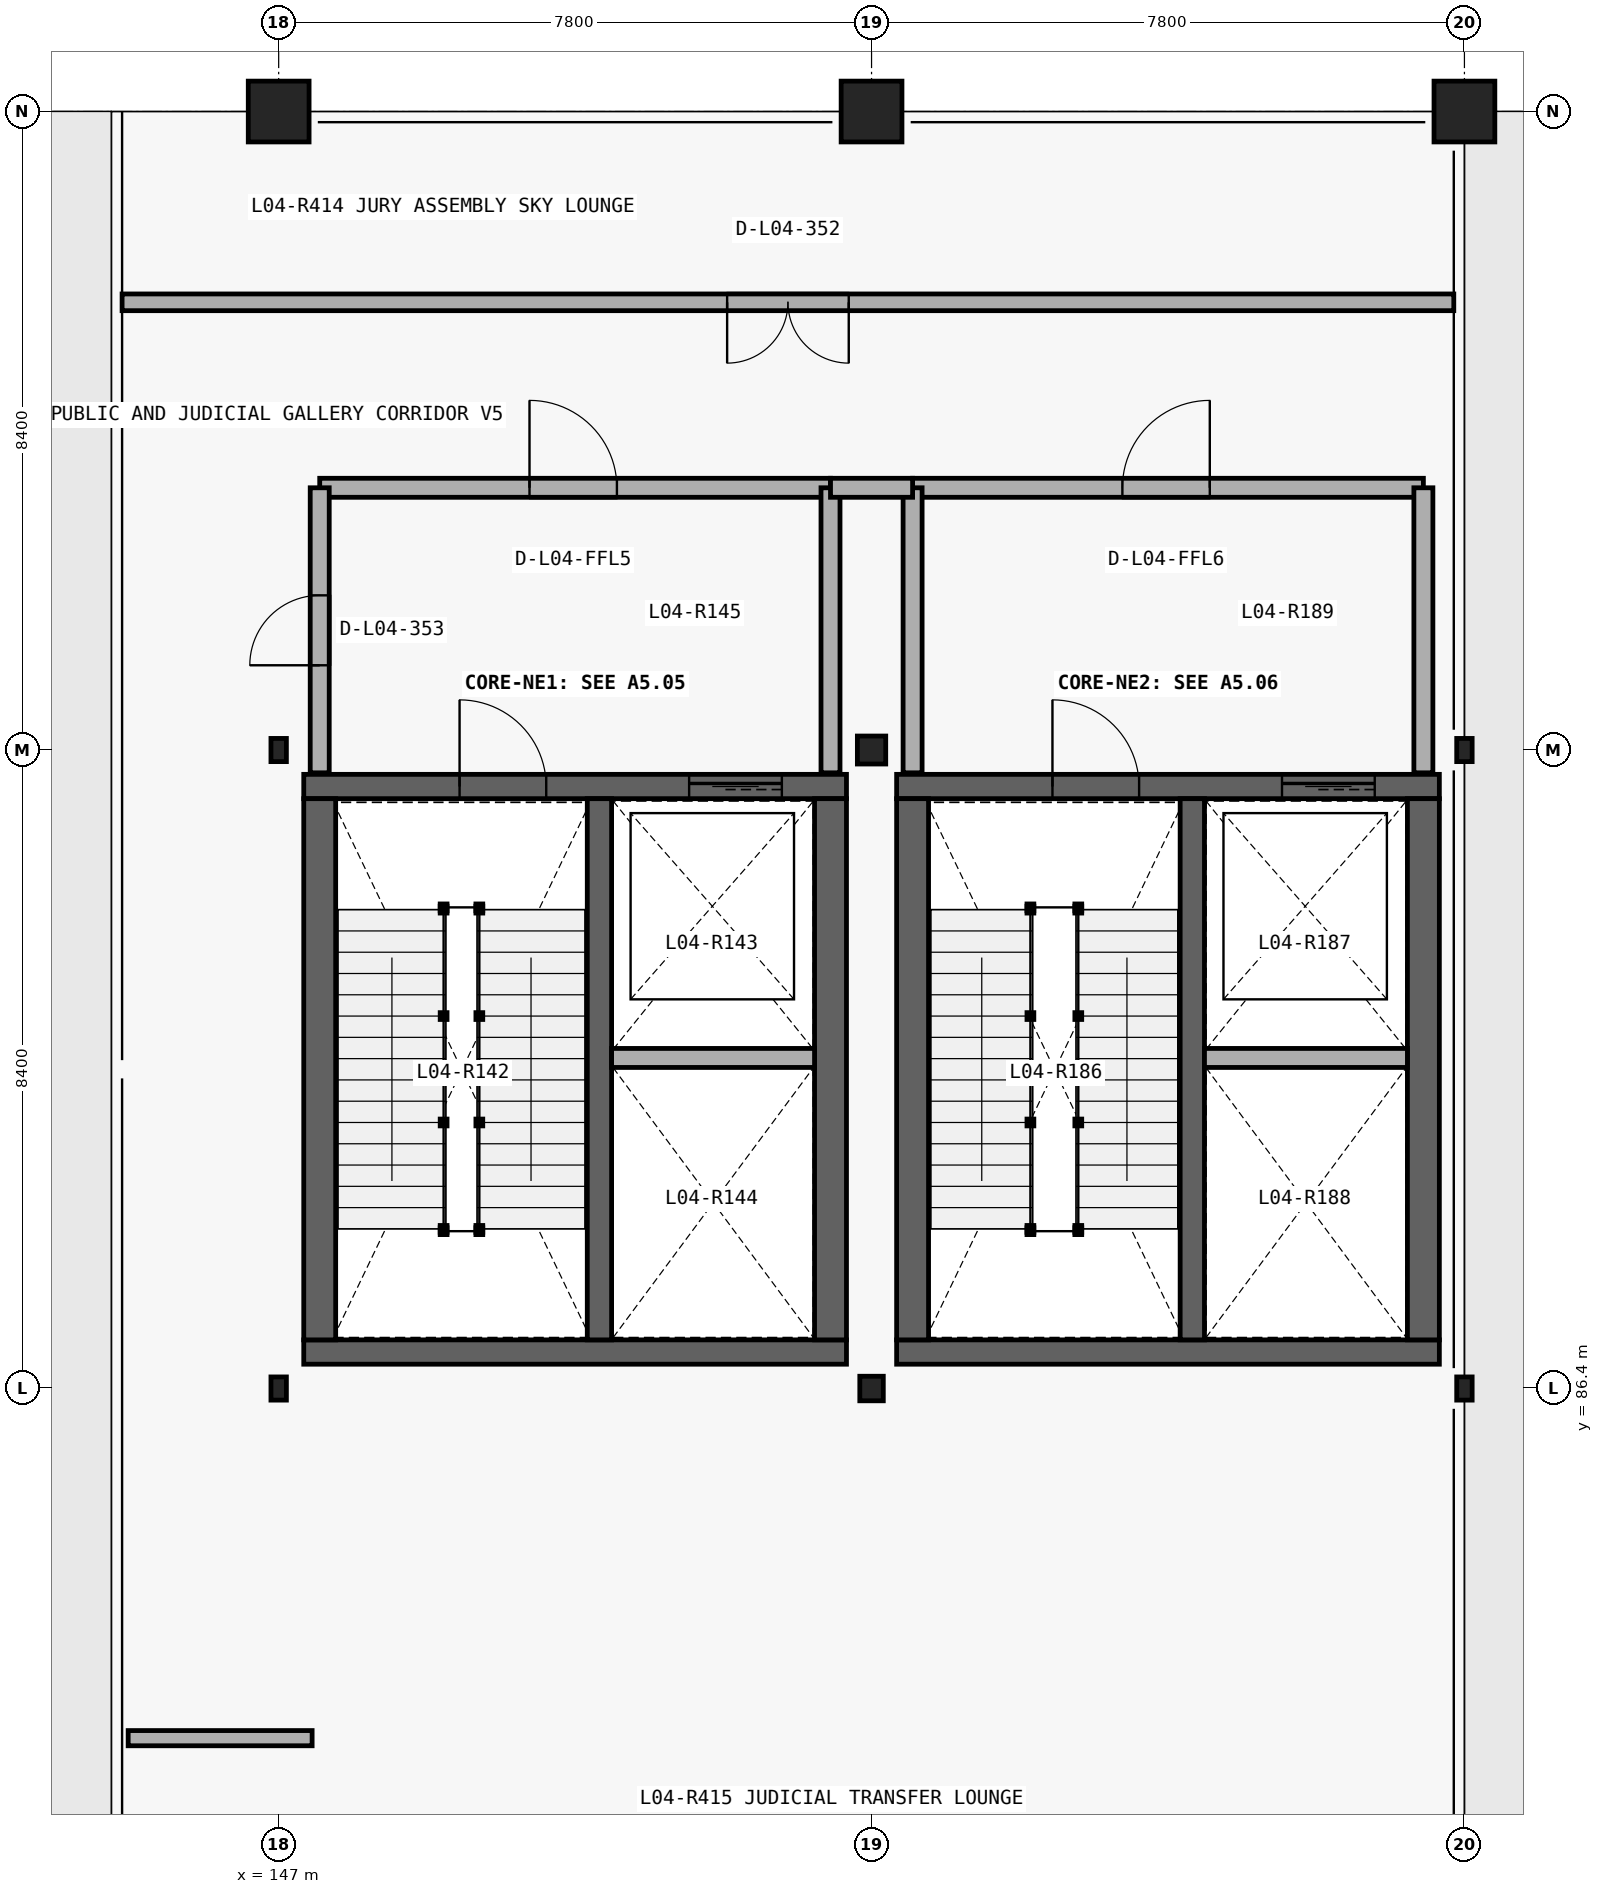
"""IFC4 building model, lengths in metres.
Left out: names, types, materials, properties, quantities, classifications, styles, units other than length and angle.
Written with IfcOpenShell. Run it as: python <this file> out.ifc"""

import sys

from ifc_helpers import new_model, si_unit, direction, frame, frame_2d, origin_with_axes, origin_2d_with_axis, place, context, subcontext, project, spatial, rectangle, hollow_rectangle, circle, i_section, extrude, element, fill, save


model = new_model("IFC4")
c1 = context("Model", 3, precision=1e-05, world=origin_with_axes(), true_north=direction((0.0, 1.0)))
c2 = subcontext(c1, "Body", "Model", "MODEL_VIEW")
j1 = project(units=[si_unit("LENGTHUNIT", "METRE"), si_unit("PLANEANGLEUNIT", "RADIAN")], contexts=[c1])
p1 = place(None, origin_with_axes())
s1 = spatial("IfcSite", under=j1, at=p1, CompositionType="ELEMENT")
p2 = place(p1, origin_with_axes())
s2 = spatial("IfcBuilding", under=s1, at=p2, CompositionType="ELEMENT")
p3 = place(p2, frame((0.0, 0.0, 20.4), z_axis=(0.0, 0.0, 1.0), x_axis=(1.0, 0.0, 0.0)))
s3 = spatial("IfcBuildingStorey", under=s2, at=p3, CompositionType="ELEMENT", Elevation=20.4)
p4 = place(None, frame((147.33, 86.88, 20.4), z_axis=(0.0, 0.0, 1.0), x_axis=(1.0, 0.0, 0.0)))
e1 = element("IfcWall", 1, at=p4, inside=s3, PredefinedType="SHEAR", context=c2, shape_type="SweptSolid", body=[
    extrude(rectangle(XDim=7.14, YDim=0.32, at=frame_2d((3.57, 0.0), x_axis=(1.0, 0.0))), origin_with_axes(), (0.0, 0.0, 1.0), 4.5),
])
p5 = place(None, frame((154.47, 94.32, 20.4), z_axis=(0.0, 0.0, 1.0), x_axis=(-1.0, 0.0, 0.0)))
e2 = element("IfcWall", 2, at=p5, inside=s3, PredefinedType="SHEAR", context=c2, shape_type="SweptSolid", body=[
    extrude(rectangle(XDim=7.14, YDim=0.32, at=frame_2d((3.57, 0.0), x_axis=(1.0, 0.0))), origin_with_axes(), (0.0, 0.0, 1.0), 4.5),
])
p6 = place(None, frame((149.95, 94.32, 20.4), z_axis=(0.0, 0.0, 1.0), x_axis=(-1.0, 0.0, 0.0)))
e3 = element("IfcOpeningElement", 3, at=p6, cuts=e2, PredefinedType="OPENING", context=c2, shape_type="SweptSolid", body=[
    extrude(rectangle(XDim=1.14, YDim=2.18, at=frame_2d((0.0, 1.09), x_axis=(1.0, 0.0))), frame((0.0, 0.17, 0.0), z_axis=(0.0, -1.0, 0.0), x_axis=(1.0, 0.0, 0.0)), (0.0, 0.0, 1.0), 0.34),
])
p7 = place(None, frame((153.01, 94.32, 20.4), z_axis=(0.0, 0.0, 1.0), x_axis=(-1.0, 0.0, 0.0)))
e4 = element("IfcOpeningElement", 4, at=p7, cuts=e2, PredefinedType="OPENING", context=c2, shape_type="SweptSolid", body=[
    extrude(rectangle(XDim=1.22, YDim=2.28, at=frame_2d((0.0, 1.14), x_axis=(1.0, 0.0))), frame((0.0, 0.17, 0.0), z_axis=(0.0, -1.0, 0.0), x_axis=(1.0, 0.0, 0.0)), (0.0, 0.0, 1.0), 0.34),
])
for number, where, z_axis, x_axis in (
    (5, (154.26, 87.04, 20.4), (0.0, 0.0, 1.0), (0.0, 1.0, 0.0)),
    (6, (147.54, 94.16, 20.4), (0.0, 0.0, 1.0), (0.0, -1.0, 0.0)),
):
    element("IfcWall", number, at=place(None, frame(where, z_axis=z_axis, x_axis=x_axis)), inside=s3, PredefinedType="SHEAR", context=c2, shape_type="SweptSolid", body=[
        extrude(rectangle(XDim=7.12, YDim=0.42, at=frame_2d((3.56, 0.0), x_axis=(1.0, 0.0))), origin_with_axes(), (0.0, 0.0, 1.0), 4.5),
    ])
p8 = place(None, frame((151.22, 87.04, 20.4), z_axis=(0.0, 0.0, 1.0), x_axis=(0.0, 1.0, 0.0)))
e7 = element("IfcWall", 7, at=p8, inside=s3, PredefinedType="SHEAR", context=c2, shape_type="SweptSolid", body=[
    extrude(rectangle(XDim=7.12, YDim=0.32, at=frame_2d((3.56, 0.0), x_axis=(1.0, 0.0))), origin_with_axes(), (0.0, 0.0, 1.0), 4.5),
])
p9 = place(None, frame((151.38, 90.749, 20.4), z_axis=(0.0, 0.0, 1.0), x_axis=(1.0, 0.0, 0.0)))
e8 = element("IfcWall", 8, at=p9, inside=s3, PredefinedType="PARTITIONING", context=c2, shape_type="SweptSolid", body=[
    extrude(rectangle(XDim=2.67, YDim=0.25, at=frame_2d((1.335, 0.0), x_axis=(1.0, 0.0))), origin_with_axes(), (0.0, 0.0, 1.0), 4.18),
])
p10 = place(None, frame((154.26, 98.25, 20.4), z_axis=(0.0, 0.0, 1.0), x_axis=(-1.0, 0.0, 0.0)))
e9 = element("IfcWall", 9, at=p10, inside=s3, PredefinedType="PARTITIONING", context=c2, shape_type="SweptSolid", body=[
    extrude(rectangle(XDim=6.72, YDim=0.25, at=frame_2d((3.36, 0.0), x_axis=(1.0, 0.0))), origin_with_axes(), (0.0, 0.0, 1.0), 4.18),
])
p11 = place(None, frame((150.875, 98.25, 20.4), z_axis=(0.0, 0.0, 1.0), x_axis=(-1.0, 0.0, 0.0)))
e10 = element("IfcOpeningElement", 10, at=p11, cuts=e9, PredefinedType="OPENING", context=c2, shape_type="SweptSolid", body=[
    extrude(rectangle(XDim=1.15, YDim=2.25, at=frame_2d((0.0, 1.125), x_axis=(1.0, 0.0))), frame((0.0, 0.135, 0.0), z_axis=(0.0, -1.0, 0.0), x_axis=(1.0, 0.0, 0.0)), (0.0, 0.0, 1.0), 0.27),
])
p12 = place(None, frame((147.54, 94.5, 20.4), z_axis=(0.0, 0.0, 1.0), x_axis=(0.0, 1.0, 0.0)))
e11 = element("IfcWall", 11, at=p12, inside=s3, PredefinedType="PARTITIONING", context=c2, shape_type="SweptSolid", body=[
    extrude(rectangle(XDim=3.75, YDim=0.25, at=frame_2d((1.875, 0.0), x_axis=(1.0, 0.0))), origin_with_axes(), (0.0, 0.0, 1.0), 4.18),
])
p13 = place(None, frame((147.54, 96.375, 20.4), z_axis=(0.0, 0.0, 1.0), x_axis=(0.0, 1.0, 0.0)))
e12 = element("IfcOpeningElement", 12, at=p13, cuts=e11, PredefinedType="OPENING", context=c2, shape_type="SweptSolid", body=[
    extrude(rectangle(XDim=0.92, YDim=2.14, at=frame_2d((0.0, 1.07), x_axis=(1.0, 0.0))), frame((0.0, 0.135, 0.0), z_axis=(0.0, -1.0, 0.0), x_axis=(1.0, 0.0, 0.0)), (0.0, 0.0, 1.0), 0.27),
])
p14 = place(None, frame((154.26, 94.5, 20.4), z_axis=(0.0, 0.0, 1.0), x_axis=(0.0, 1.0, 0.0)))
e13 = element("IfcWall", 13, at=p14, inside=s3, PredefinedType="PARTITIONING", context=c2, shape_type="SweptSolid", body=[
    extrude(rectangle(XDim=3.75, YDim=0.25, at=frame_2d((1.875, 0.0), x_axis=(1.0, 0.0))), origin_with_axes(), (0.0, 0.0, 1.0), 4.18),
])
p15 = place(None, frame((155.13, 86.88, 20.4), z_axis=(0.0, 0.0, 1.0), x_axis=(1.0, 0.0, 0.0)))
e14 = element("IfcWall", 14, at=p15, inside=s3, PredefinedType="SHEAR", context=c2, shape_type="SweptSolid", body=[
    extrude(rectangle(XDim=7.14, YDim=0.32, at=frame_2d((3.57, 0.0), x_axis=(1.0, 0.0))), origin_with_axes(), (0.0, 0.0, 1.0), 4.5),
])
p16 = place(None, frame((162.27, 94.32, 20.4), z_axis=(0.0, 0.0, 1.0), x_axis=(-1.0, 0.0, 0.0)))
e15 = element("IfcWall", 15, at=p16, inside=s3, PredefinedType="SHEAR", context=c2, shape_type="SweptSolid", body=[
    extrude(rectangle(XDim=7.14, YDim=0.32, at=frame_2d((3.57, 0.0), x_axis=(1.0, 0.0))), origin_with_axes(), (0.0, 0.0, 1.0), 4.5),
])
p17 = place(None, frame((157.75, 94.32, 20.4), z_axis=(0.0, 0.0, 1.0), x_axis=(-1.0, 0.0, 0.0)))
e16 = element("IfcOpeningElement", 16, at=p17, cuts=e15, PredefinedType="OPENING", context=c2, shape_type="SweptSolid", body=[
    extrude(rectangle(XDim=1.14, YDim=2.18, at=frame_2d((0.0, 1.09), x_axis=(1.0, 0.0))), frame((0.0, 0.17, 0.0), z_axis=(0.0, -1.0, 0.0), x_axis=(1.0, 0.0, 0.0)), (0.0, 0.0, 1.0), 0.34),
])
p18 = place(None, frame((160.81, 94.32, 20.4), z_axis=(0.0, 0.0, 1.0), x_axis=(-1.0, 0.0, 0.0)))
e17 = element("IfcOpeningElement", 17, at=p18, cuts=e15, PredefinedType="OPENING", context=c2, shape_type="SweptSolid", body=[
    extrude(rectangle(XDim=1.22, YDim=2.28, at=frame_2d((0.0, 1.14), x_axis=(1.0, 0.0))), frame((0.0, 0.17, 0.0), z_axis=(0.0, -1.0, 0.0), x_axis=(1.0, 0.0, 0.0)), (0.0, 0.0, 1.0), 0.34),
])
for number, where, z_axis, x_axis in (
    (18, (162.06, 87.04, 20.4), (0.0, 0.0, 1.0), (0.0, 1.0, 0.0)),
    (19, (155.34, 94.16, 20.4), (0.0, 0.0, 1.0), (0.0, -1.0, 0.0)),
):
    element("IfcWall", number, at=place(None, frame(where, z_axis=z_axis, x_axis=x_axis)), inside=s3, PredefinedType="SHEAR", context=c2, shape_type="SweptSolid", body=[
        extrude(rectangle(XDim=7.12, YDim=0.42, at=frame_2d((3.56, 0.0), x_axis=(1.0, 0.0))), origin_with_axes(), (0.0, 0.0, 1.0), 4.5),
    ])
p19 = place(None, frame((159.02, 87.04, 20.4), z_axis=(0.0, 0.0, 1.0), x_axis=(0.0, 1.0, 0.0)))
e20 = element("IfcWall", 20, at=p19, inside=s3, PredefinedType="SHEAR", context=c2, shape_type="SweptSolid", body=[
    extrude(rectangle(XDim=7.12, YDim=0.32, at=frame_2d((3.56, 0.0), x_axis=(1.0, 0.0))), origin_with_axes(), (0.0, 0.0, 1.0), 4.5),
])
p20 = place(None, frame((159.18, 90.749, 20.4), z_axis=(0.0, 0.0, 1.0), x_axis=(1.0, 0.0, 0.0)))
e21 = element("IfcWall", 21, at=p20, inside=s3, PredefinedType="PARTITIONING", context=c2, shape_type="SweptSolid", body=[
    extrude(rectangle(XDim=2.67, YDim=0.25, at=frame_2d((1.335, 0.0), x_axis=(1.0, 0.0))), origin_with_axes(), (0.0, 0.0, 1.0), 4.18),
])
p21 = place(None, frame((162.06, 98.25, 20.4), z_axis=(0.0, 0.0, 1.0), x_axis=(-1.0, 0.0, 0.0)))
e22 = element("IfcWall", 22, at=p21, inside=s3, PredefinedType="PARTITIONING", context=c2, shape_type="SweptSolid", body=[
    extrude(rectangle(XDim=6.72, YDim=0.25, at=frame_2d((3.36, 0.0), x_axis=(1.0, 0.0))), origin_with_axes(), (0.0, 0.0, 1.0), 4.18),
])
p22 = place(None, frame((158.675, 98.25, 20.4), z_axis=(0.0, 0.0, 1.0), x_axis=(-1.0, 0.0, 0.0)))
e23 = element("IfcOpeningElement", 23, at=p22, cuts=e22, PredefinedType="OPENING", context=c2, shape_type="SweptSolid", body=[
    extrude(rectangle(XDim=1.15, YDim=2.25, at=frame_2d((0.0, 1.125), x_axis=(1.0, 0.0))), frame((0.0, 0.135, 0.0), z_axis=(0.0, -1.0, 0.0), x_axis=(1.0, 0.0, 0.0)), (0.0, 0.0, 1.0), 0.27),
])
for number, where, z_axis, x_axis in (
    (24, (155.34, 94.5, 20.4), (0.0, 0.0, 1.0), (0.0, 1.0, 0.0)),
    (25, (162.06, 94.5, 20.4), (0.0, 0.0, 1.0), (0.0, 1.0, 0.0)),
):
    element("IfcWall", number, at=place(None, frame(where, z_axis=z_axis, x_axis=x_axis)), inside=s3, PredefinedType="PARTITIONING", context=c2, shape_type="SweptSolid", body=[
        extrude(rectangle(XDim=3.75, YDim=0.25, at=frame_2d((1.875, 0.0), x_axis=(1.0, 0.0))), origin_with_axes(), (0.0, 0.0, 1.0), 4.18),
    ])
p23 = place(None, frame((154.26, 98.25, 20.4), z_axis=(0.0, 0.0, 1.0), x_axis=(1.0, 0.0, 0.0)))
e26 = element("IfcWall", 26, at=p23, inside=s3, PredefinedType="PARTITIONING", context=c2, shape_type="SweptSolid", body=[
    extrude(rectangle(XDim=1.08, YDim=0.25, at=frame_2d((0.54, 0.0), x_axis=(1.0, 0.0))), origin_with_axes(), (0.0, 0.0, 1.0), 4.18),
])
p24 = place(None, frame((145.02, 81.8, 20.4), z_axis=(0.0, 0.0, 1.0), x_axis=(1.0, 0.0, 0.0)))
e27 = element("IfcWall", 27, at=p24, inside=s3, PredefinedType="PARTITIONING", context=c2, shape_type="SweptSolid", body=[
    extrude(rectangle(XDim=2.42, YDim=0.2, at=frame_2d((1.21, 0.0), x_axis=(1.0, 0.0))), origin_with_axes(), (0.0, 0.0, 1.0), 4.18),
])
p25 = place(None, frame((144.94, 100.69, 20.4), z_axis=(0.0, 0.0, 1.0), x_axis=(1.0, 0.0, 0.0)))
e28 = element("IfcWall", 28, at=p25, inside=s3, PredefinedType="PARTITIONING", context=c2, shape_type="SweptSolid", body=[
    extrude(rectangle(XDim=17.52, YDim=0.22, at=frame_2d((8.76, 0.0), x_axis=(1.0, 0.0))), origin_with_axes(), (0.0, 0.0, 1.0), 4.18),
])
p26 = place(None, frame((153.7, 100.69, 20.4), z_axis=(0.0, 0.0, 1.0), x_axis=(1.0, 0.0, 0.0)))
e29 = element("IfcOpeningElement", 29, at=p26, cuts=e28, PredefinedType="OPENING", context=c2, shape_type="SweptSolid", body=[
    extrude(rectangle(XDim=1.6, YDim=2.32, at=frame_2d((0.0, 1.16), x_axis=(1.0, 0.0))), frame((0.0, 0.12, 0.0), z_axis=(0.0, -1.0, 0.0), x_axis=(1.0, 0.0, 0.0)), (0.0, 0.0, 1.0), 0.24),
])
for number, where, z_axis, x_axis in (
    (30, (147.0, 86.4, 20.4), (0.0, 0.0, 1.0), (1.0, 0.0, 0.0)),
    (31, (147.0, 94.8, 20.4), (0.0, 0.0, 1.0), (1.0, 0.0, 0.0)),
):
    element("IfcColumn", number, at=place(None, frame(where, z_axis=z_axis, x_axis=x_axis)), inside=s3, PredefinedType="COLUMN", context=c2, shape_type="SweptSolid", body=[
        extrude(hollow_rectangle(XDim=0.203, YDim=0.305, WallThickness=0.013, InnerFilletRadius=0.025, OuterFilletRadius=0.013, at=origin_2d_with_axis()), origin_with_axes(), (0.0, 0.0, 1.0), 4.5),
    ])
p27 = place(None, frame((147.0, 103.2, 20.4), z_axis=(0.0, 0.0, 1.0), x_axis=(1.0, 0.0, 0.0)))
e32 = element("IfcColumn", 32, at=p27, inside=s3, PredefinedType="COLUMN", context=c2, shape_type="SweptSolid", body=[
    extrude(circle(Radius=0.4, at=origin_2d_with_axis()), origin_with_axes(), (0.0, 0.0, 1.0), 4.5),
])
p28 = place(None, frame((154.8, 86.4, 20.4), z_axis=(0.0, 0.0, 1.0), x_axis=(1.0, 0.0, 0.0)))
e33 = element("IfcColumn", 33, at=p28, inside=s3, PredefinedType="COLUMN", context=c2, shape_type="SweptSolid", body=[
    extrude(i_section(OverallWidth=0.309, OverallDepth=0.323, WebThickness=0.014, FlangeThickness=0.023, at=origin_2d_with_axis()), origin_with_axes(), (0.0, 0.0, 1.0), 4.5),
])
p29 = place(None, frame((154.8, 94.8, 20.4), z_axis=(0.0, 0.0, 1.0), x_axis=(1.0, 0.0, 0.0)))
e34 = element("IfcColumn", 34, at=p29, inside=s3, PredefinedType="COLUMN", context=c2, shape_type="SweptSolid", body=[
    extrude(i_section(OverallWidth=0.373, OverallDepth=0.368, WebThickness=0.015, FlangeThickness=0.024, at=origin_2d_with_axis()), origin_with_axes(), (0.0, 0.0, 1.0), 4.5),
])
p30 = place(None, frame((154.8, 103.2, 20.4), z_axis=(0.0, 0.0, 1.0), x_axis=(1.0, 0.0, 0.0)))
e35 = element("IfcColumn", 35, at=p30, inside=s3, PredefinedType="COLUMN", context=c2, shape_type="SweptSolid", body=[
    extrude(circle(Radius=0.4, at=origin_2d_with_axis()), origin_with_axes(), (0.0, 0.0, 1.0), 4.5),
])
for number, where, z_axis, x_axis in (
    (36, (162.6, 86.4, 20.4), (0.0, 0.0, 1.0), (1.0, 0.0, 0.0)),
    (37, (162.6, 94.8, 20.4), (0.0, 0.0, 1.0), (1.0, 0.0, 0.0)),
):
    element("IfcColumn", number, at=place(None, frame(where, z_axis=z_axis, x_axis=x_axis)), inside=s3, PredefinedType="COLUMN", context=c2, shape_type="SweptSolid", body=[
        extrude(hollow_rectangle(XDim=0.203, YDim=0.305, WallThickness=0.013, InnerFilletRadius=0.025, OuterFilletRadius=0.013, at=origin_2d_with_axis()), origin_with_axes(), (0.0, 0.0, 1.0), 4.5),
    ])
p31 = place(None, frame((162.6, 103.2, 20.4), z_axis=(0.0, 0.0, 1.0), x_axis=(1.0, 0.0, 0.0)))
e38 = element("IfcColumn", 38, at=p31, inside=s3, PredefinedType="COLUMN", context=c2, shape_type="SweptSolid", body=[
    extrude(circle(Radius=0.4, at=origin_2d_with_axis()), origin_with_axes(), (0.0, 0.0, 1.0), 4.5),
])
p32 = place(None, frame((149.95, 94.32, 20.4), z_axis=(0.0, 0.0, 1.0), x_axis=(1.0, 0.0, 0.0)))
e39 = element("IfcDoor", 39, at=p32, inside=s3, OperationType="SINGLE_SWING_RIGHT", PredefinedType="DOOR", context=c2, shape_type="SweptSolid", body=[
    extrude(rectangle(XDim=1.14, YDim=2.18, at=frame_2d((0.0, 1.09), x_axis=(1.0, 0.0))), frame((0.0, 0.04, 0.0), z_axis=(0.0, -1.0, 0.0), x_axis=(1.0, 0.0, 0.0)), (0.0, 0.0, 1.0), 0.08),
])
fill(e3, e39)
p33 = place(None, frame((153.01, 94.32, 20.4), z_axis=(0.0, 0.0, 1.0), x_axis=(1.0, 0.0, 0.0)))
e40 = element("IfcDoor", 40, at=p33, inside=s3, OperationType="SLIDING_TO_LEFT", PredefinedType="DOOR", context=c2, shape_type="SweptSolid", body=[
    extrude(rectangle(XDim=1.22, YDim=2.28, at=frame_2d((0.0, 1.14), x_axis=(1.0, 0.0))), frame((0.0, 0.04, 0.0), z_axis=(0.0, -1.0, 0.0), x_axis=(1.0, 0.0, 0.0)), (0.0, 0.0, 1.0), 0.08),
])
fill(e4, e40)
p34 = place(None, frame((150.875, 98.25, 20.4), z_axis=(0.0, 0.0, 1.0), x_axis=(1.0, 0.0, 0.0)))
e41 = element("IfcDoor", 41, at=p34, inside=s3, OperationType="SINGLE_SWING_RIGHT", PredefinedType="DOOR", context=c2, shape_type="SweptSolid", body=[
    extrude(rectangle(XDim=1.15, YDim=2.25, at=frame_2d((0.0, 1.125), x_axis=(1.0, 0.0))), frame((0.0, 0.04, 0.0), z_axis=(0.0, -1.0, 0.0), x_axis=(1.0, 0.0, 0.0)), (0.0, 0.0, 1.0), 0.08),
])
fill(e10, e41)
p35 = place(None, frame((157.75, 94.32, 20.4), z_axis=(0.0, 0.0, 1.0), x_axis=(1.0, 0.0, 0.0)))
e42 = element("IfcDoor", 42, at=p35, inside=s3, OperationType="SINGLE_SWING_RIGHT", PredefinedType="DOOR", context=c2, shape_type="SweptSolid", body=[
    extrude(rectangle(XDim=1.14, YDim=2.18, at=frame_2d((0.0, 1.09), x_axis=(1.0, 0.0))), frame((0.0, 0.04, 0.0), z_axis=(0.0, -1.0, 0.0), x_axis=(1.0, 0.0, 0.0)), (0.0, 0.0, 1.0), 0.08),
])
fill(e16, e42)
p36 = place(None, frame((160.81, 94.32, 20.4), z_axis=(0.0, 0.0, 1.0), x_axis=(1.0, 0.0, 0.0)))
e43 = element("IfcDoor", 43, at=p36, inside=s3, OperationType="SLIDING_TO_LEFT", PredefinedType="DOOR", context=c2, shape_type="SweptSolid", body=[
    extrude(rectangle(XDim=1.22, YDim=2.28, at=frame_2d((0.0, 1.14), x_axis=(1.0, 0.0))), frame((0.0, 0.04, 0.0), z_axis=(0.0, -1.0, 0.0), x_axis=(1.0, 0.0, 0.0)), (0.0, 0.0, 1.0), 0.08),
])
fill(e17, e43)
p37 = place(None, frame((158.675, 98.25, 20.4), z_axis=(0.0, 0.0, 1.0), x_axis=(1.0, 0.0, 0.0)))
e44 = element("IfcDoor", 44, at=p37, inside=s3, OperationType="SINGLE_SWING_LEFT", PredefinedType="DOOR", context=c2, shape_type="SweptSolid", body=[
    extrude(rectangle(XDim=1.15, YDim=2.25, at=frame_2d((0.0, 1.125), x_axis=(1.0, 0.0))), frame((0.0, 0.04, 0.0), z_axis=(0.0, -1.0, 0.0), x_axis=(1.0, 0.0, 0.0)), (0.0, 0.0, 1.0), 0.08),
])
fill(e23, e44)
p38 = place(None, frame((153.7, 100.69, 20.4), z_axis=(0.0, 0.0, 1.0), x_axis=(-1.0, 0.0, 0.0)))
e45 = element("IfcDoor", 45, at=p38, inside=s3, OperationType="DOUBLE_DOOR_SINGLE_SWING", PredefinedType="DOOR", context=c2, shape_type="SweptSolid", body=[
    extrude(rectangle(XDim=1.6, YDim=2.32, at=frame_2d((0.0, 1.16), x_axis=(1.0, 0.0))), frame((0.0, 0.04, 0.0), z_axis=(0.0, -1.0, 0.0), x_axis=(1.0, 0.0, 0.0)), (0.0, 0.0, 1.0), 0.08),
])
fill(e29, e45)
p39 = place(None, frame((147.54, 96.375, 20.4), z_axis=(0.0, 0.0, 1.0), x_axis=(0.0, 1.0, 0.0)))
e46 = element("IfcDoor", 46, at=p39, inside=s3, OperationType="SINGLE_SWING_LEFT", PredefinedType="DOOR", context=c2, shape_type="SweptSolid", body=[
    extrude(rectangle(XDim=0.92, YDim=2.14, at=frame_2d((0.0, 1.07), x_axis=(1.0, 0.0))), frame((0.0, 0.04, 0.0), z_axis=(0.0, -1.0, 0.0), x_axis=(1.0, 0.0, 0.0)), (0.0, 0.0, 1.0), 0.08),
])
fill(e12, e46)
save(model, sys.argv[1])
